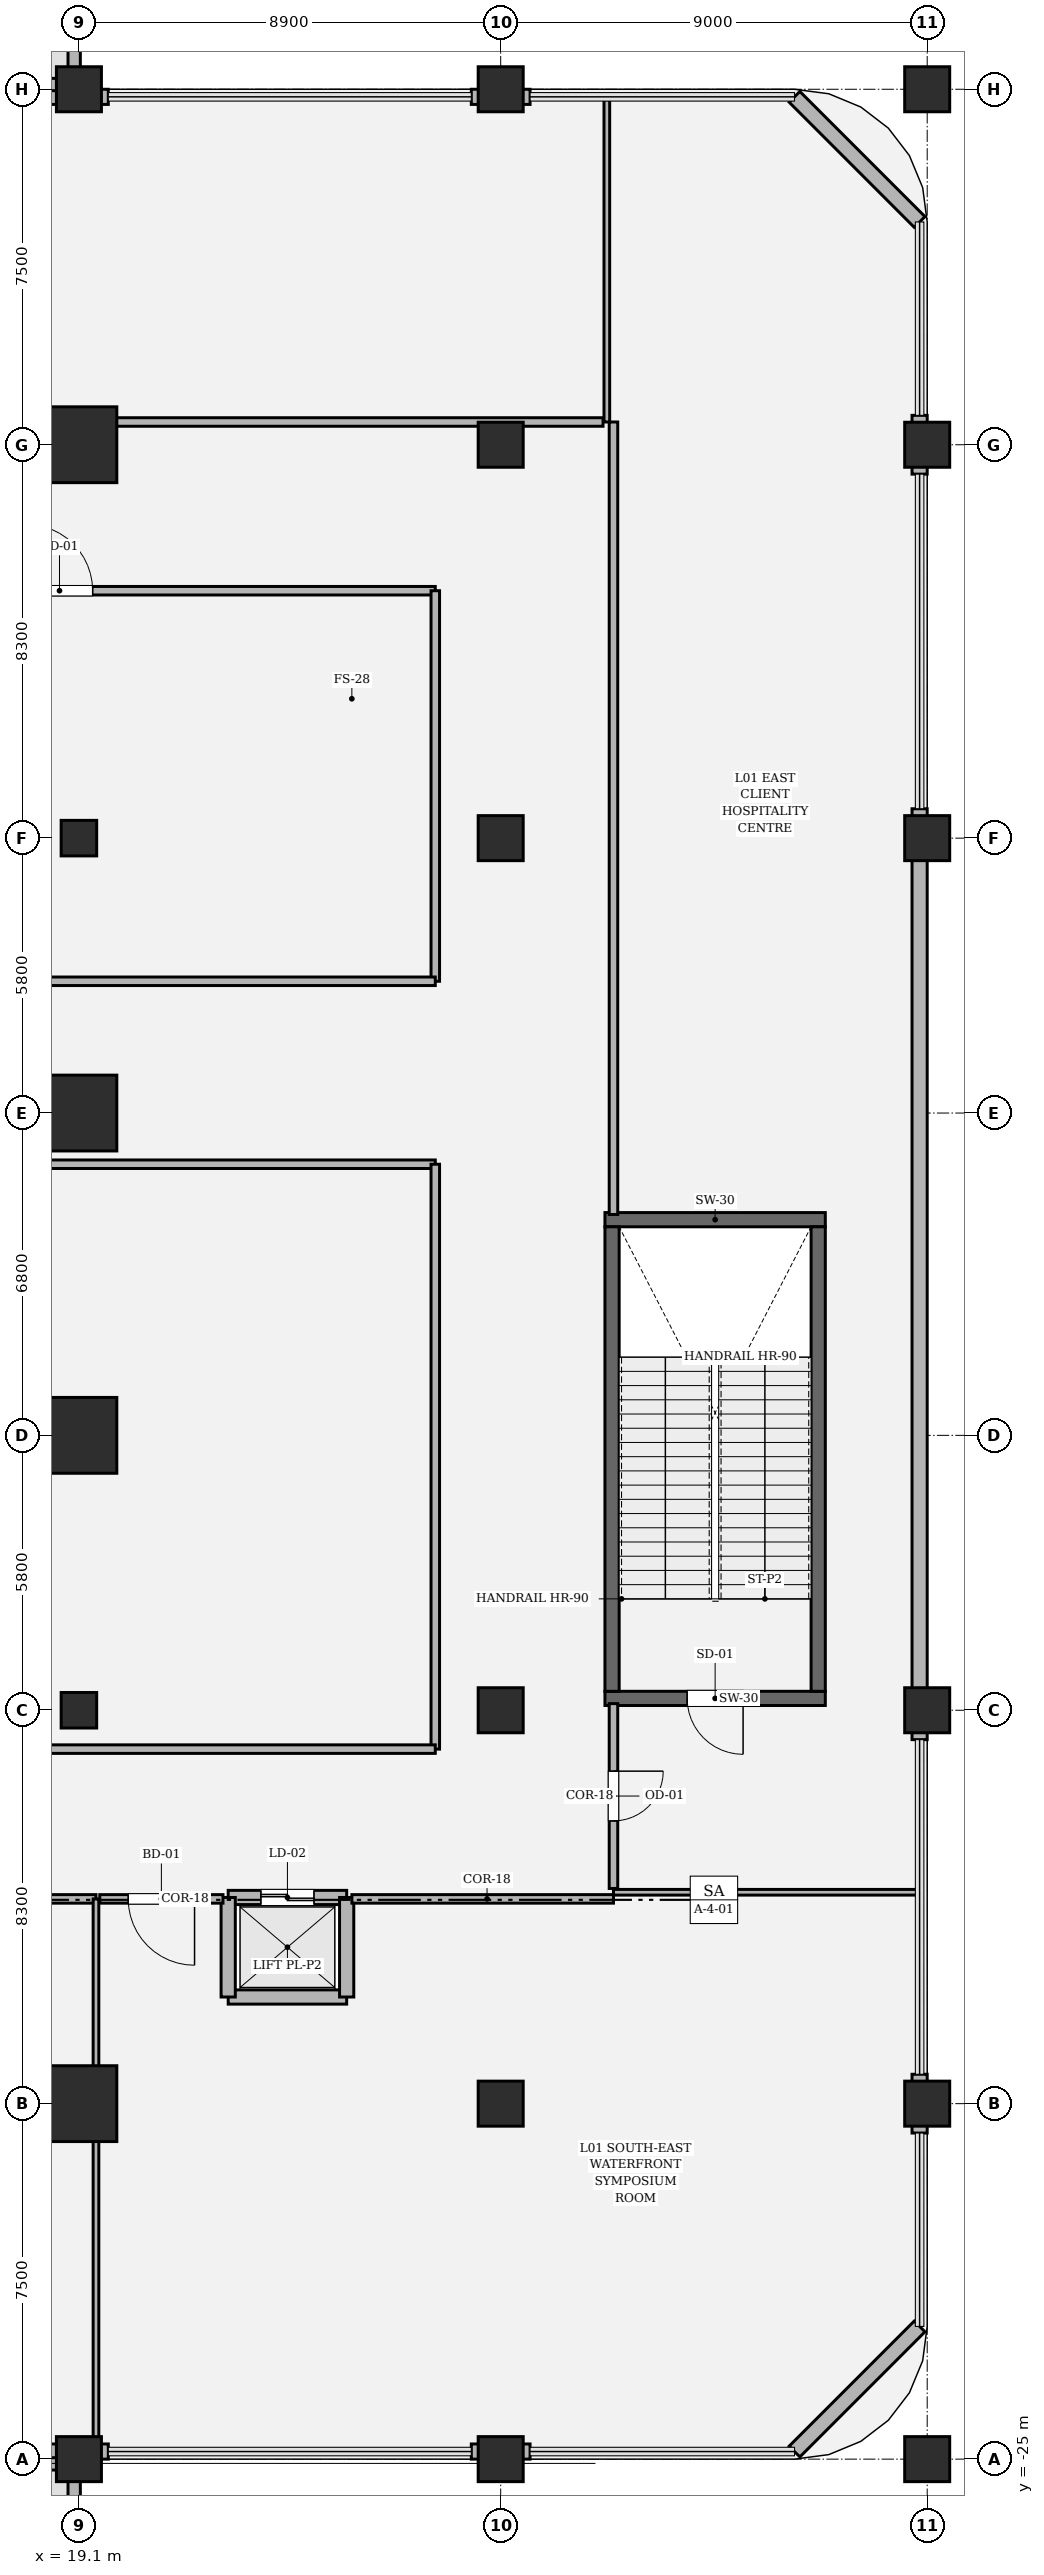
"""IFC4 building model, lengths in metres.
Left out: names, types, materials, properties, quantities, classifications, styles, units other than length and angle.
Written with IfcOpenShell. Run it as: python <this file> out.ifc"""

import sys

from ifc_helpers import new_model, si_unit, direction, frame, frame_2d, origin, origin_2d, place, context, subcontext, project, spatial, rectangle, hollow_rectangle, circle, extrude, element, fill, save


model = new_model("IFC4")
c1 = context("Model", 3, precision=1e-05, world=origin(), true_north=direction((0.0, 1.0)))
c2 = subcontext(c1, "Body", "Model", "MODEL_VIEW")
j1 = project(units=[si_unit("LENGTHUNIT", "METRE"), si_unit("PLANEANGLEUNIT", "RADIAN")], contexts=[c1])
p1 = place(None, origin())
s1 = spatial("IfcSite", under=j1, at=p1, CompositionType="ELEMENT")
p2 = place(p1, origin())
s2 = spatial("IfcBuilding", under=s1, at=p2, CompositionType="ELEMENT")
p3 = place(p2, frame((0.0, 0.0, 6.0)))
s3 = spatial("IfcBuildingStorey", under=s2, at=p3, CompositionType="ELEMENT", Elevation=6.0)
p4 = place(p3, frame((30.2, -8.95, 0.0), z_axis=(0.0, 0.0, 1.0), x_axis=(1.0, 0.0, 0.0)))
e1 = element("IfcWall", 1, at=p4, inside=s3, PredefinedType="SOLIDWALL", context=c2, shape_type="SweptSolid", body=[
    extrude(rectangle(XDim=4.65, YDim=0.3, at=frame_2d((2.325, 0.0))), origin(), (0.0, 0.0, 1.0), 5.4),
])
p5 = place(p4, frame((1.735, 0.0, 0.0)))
e2 = element("IfcOpeningElement", 2, at=p5, cuts=e1, PredefinedType="OPENING", context=c2, shape_type="SweptSolid", body=[
    extrude(rectangle(XDim=1.18, YDim=2.2, at=frame_2d((0.59, 1.1))), frame((0.0, 0.16, 0.0), z_axis=(0.0, -1.0, 0.0), x_axis=(1.0, 0.0, 0.0)), (0.0, 0.0, 1.0), 0.32),
])
p6 = place(p3, frame((34.85, 1.15, 0.0), z_axis=(0.0, 0.0, 1.0), x_axis=(-1.0, 0.0, 0.0)))
e3 = element("IfcWall", 3, at=p6, inside=s3, PredefinedType="SOLIDWALL", context=c2, shape_type="SweptSolid", body=[
    extrude(rectangle(XDim=4.65, YDim=0.3, at=frame_2d((2.325, 0.0))), origin(), (0.0, 0.0, 1.0), 5.4),
])
for number, where, z_axis, x_axis in (
    (4, (30.35, -8.8, 0.0), (0.0, 0.0, 1.0), (0.0, 1.0, 0.0)),
    (5, (34.7, 1.0, 0.0), (0.0, 0.0, 1.0), (0.0, -1.0, 0.0)),
):
    element("IfcWall", number, at=place(p3, frame(where, z_axis=z_axis, x_axis=x_axis)), inside=s3, PredefinedType="SOLIDWALL", context=c2, shape_type="SweptSolid", body=[
        extrude(rectangle(XDim=9.8, YDim=0.3, at=frame_2d((4.9, 0.0))), origin(), (0.0, 0.0, 1.0), 5.4),
    ])
for number, where, z_axis, x_axis in (
    (6, (19.1, -17.5, 0.0), (0.0, 0.0, 1.0), (1.0, 0.0, 0.0)),
    (7, (19.1, -3.4, 0.0), (0.0, 0.0, 1.0), (1.0, 0.0, 0.0)),
    (8, (19.1, 3.4, 0.0), (0.0, 0.0, 1.0), (1.0, 0.0, 0.0)),
    (9, (19.1, 17.5, 0.0), (0.0, 0.0, 1.0), (1.0, 0.0, 0.0)),
):
    element("IfcColumn", number, at=place(p3, frame(where, z_axis=z_axis, x_axis=x_axis)), inside=s3, PredefinedType="COLUMN", context=c2, shape_type="SweptSolid", body=[
        extrude(hollow_rectangle(XDim=1.6, YDim=1.6, WallThickness=0.05, at=origin_2d()), origin(), (0.0, 0.0, 1.0), 5.4),
    ])
for number, where, z_axis, x_axis in (
    (10, (19.1, -25.0, 0.0), (0.0, 0.0, 1.0), (1.0, 0.0, 0.0)),
    (11, (28.0, -25.0, 0.0), (0.0, 0.0, 1.0), (1.0, 0.0, 0.0)),
    (12, (37.0, -25.0, 0.0), (0.0, 0.0, 1.0), (1.0, 0.0, 0.0)),
    (13, (28.0, -17.5, 0.0), (0.0, 0.0, 1.0), (1.0, 0.0, 0.0)),
    (14, (37.0, -17.5, 0.0), (0.0, 0.0, 1.0), (1.0, 0.0, 0.0)),
    (15, (37.0, -9.2, 0.0), (0.0, 0.0, 1.0), (1.0, 0.0, 0.0)),
    (16, (37.0, 9.2, 0.0), (0.0, 0.0, 1.0), (1.0, 0.0, 0.0)),
    (17, (28.0, 17.5, 0.0), (0.0, 0.0, 1.0), (1.0, 0.0, 0.0)),
    (18, (37.0, 17.5, 0.0), (0.0, 0.0, 1.0), (1.0, 0.0, 0.0)),
    (19, (19.1, 25.0, 0.0), (0.0, 0.0, 1.0), (1.0, 0.0, 0.0)),
    (20, (28.0, 25.0, 0.0), (0.0, 0.0, 1.0), (1.0, 0.0, 0.0)),
    (21, (37.0, 25.0, 0.0), (0.0, 0.0, 1.0), (1.0, 0.0, 0.0)),
    (22, (28.0, -9.2, 0.0), (0.0, 0.0, 1.0), (1.0, 0.0, 0.0)),
    (23, (28.0, 9.2, 0.0), (0.0, 0.0, 1.0), (1.0, 0.0, 0.0)),
):
    element("IfcColumn", number, at=place(p3, frame(where, z_axis=z_axis, x_axis=x_axis)), inside=s3, PredefinedType="COLUMN", context=c2, shape_type="SweptSolid", body=[
        extrude(rectangle(XDim=0.95, YDim=0.95, at=origin_2d()), origin(), (0.0, 0.0, 1.0), 5.4),
    ])
for number, where, z_axis, x_axis in (
    (24, (19.1, -9.2, 0.0), (0.0, 0.0, 1.0), (1.0, 0.0, 0.0)),
    (25, (19.1, 9.2, 0.0), (0.0, 0.0, 1.0), (1.0, 0.0, 0.0)),
):
    element("IfcColumn", number, at=place(p3, frame(where, z_axis=z_axis, x_axis=x_axis)), inside=s3, PredefinedType="PILASTER", context=c2, shape_type="SweptSolid", body=[
        extrude(circle(Radius=0.375, at=origin_2d()), origin(), (0.0, 0.0, 1.0), 5.4),
    ])
for number, where, z_axis, x_axis in (
    (26, (18.48, -24.84, 0.0), (0.0, 0.0, 1.0), (1.0, 0.0, 0.0)),
    (27, (19.72, 24.84, 0.0), (0.0, 0.0, 1.0), (-1.0, 0.0, 0.0)),
):
    element("IfcWall", number, at=place(p3, frame(where, z_axis=z_axis, x_axis=x_axis)), inside=s3, PredefinedType="SOLIDWALL", context=c2, shape_type="SweptSolid", body=[
        extrude(rectangle(XDim=1.24, YDim=0.32, at=frame_2d((0.62, 0.0))), origin(), (0.0, 0.0, 1.0), 4.414),
    ])
for number, where, z_axis, x_axis in (
    (28, (27.38, -24.84, 0.0), (0.0, 0.0, 1.0), (1.0, 0.0, 0.0)),
    (29, (28.62, 24.84, 0.0), (0.0, 0.0, 1.0), (-1.0, 0.0, 0.0)),
):
    element("IfcWall", number, at=place(p3, frame(where, z_axis=z_axis, x_axis=x_axis)), inside=s3, PredefinedType="SOLIDWALL", context=c2, shape_type="SweptSolid", body=[
        extrude(rectangle(XDim=1.24, YDim=0.32, at=frame_2d((0.62, 0.0))), origin(), (0.0, 0.0, 1.0), 4.414),
    ])
p7 = place(p3, frame((36.84, 9.82, 0.0), z_axis=(0.0, 0.0, 1.0), x_axis=(0.0, -1.0, 0.0)))
e30 = element("IfcWall", 30, at=p7, inside=s3, PredefinedType="SOLIDWALL", context=c2, shape_type="SweptSolid", body=[
    extrude(rectangle(XDim=19.64, YDim=0.32, at=frame_2d((9.82, 0.0))), origin(), (0.0, 0.0, 1.0), 4.414),
])
for number, where, z_axis, x_axis in (
    (31, (36.84, -16.88, 0.0), (0.0, 0.0, 1.0), (0.0, -1.0, 0.0)),
    (32, (36.84, 18.12, 0.0), (0.0, 0.0, 1.0), (0.0, -1.0, 0.0)),
):
    element("IfcWall", number, at=place(p3, frame(where, z_axis=z_axis, x_axis=x_axis)), inside=s3, PredefinedType="SOLIDWALL", context=c2, shape_type="SweptSolid", body=[
        extrude(rectangle(XDim=1.24, YDim=0.32, at=frame_2d((0.62, 0.0))), origin(), (0.0, 0.0, 1.0), 4.414),
    ])
for number, where, z_axis, x_axis in (
    (33, (34.2, 24.84, 0.0), (0.0, 0.0, 1.0), (0.707, -0.707, 0.0)),
    (34, (36.84, -22.2, 0.0), (0.0, 0.0, 1.0), (-0.707, -0.707, 0.0)),
):
    element("IfcWall", number, at=place(p3, frame(where, z_axis=z_axis, x_axis=x_axis)), inside=s3, PredefinedType="SOLIDWALL", context=c2, shape_type="SweptSolid", body=[
        extrude(rectangle(XDim=3.734, YDim=0.32, at=frame_2d((1.867, 0.0))), origin(), (0.0, 0.0, 1.0), 4.564),
    ])
p8 = place(p3, frame((19.0, -27.62, 0.0), z_axis=(0.0, 0.0, 1.0), x_axis=(0.0, 1.0, 0.0)))
e35 = element("IfcWall", 35, at=p8, inside=s3, PredefinedType="PARAPET", context=c2, shape_type="SweptSolid", body=[
    extrude(rectangle(XDim=2.52, YDim=0.26, at=frame_2d((1.26, 0.0))), origin(), (0.0, 0.0, 1.0), 1.15),
])
for number, where, z_axis, x_axis in (
    (36, (19.0, -25.1, 0.0), (0.0, 0.0, 1.0), (-1.0, 0.0, 0.0)),
    (37, (-19.0, 25.1, 0.0), (0.0, 0.0, 1.0), (1.0, 0.0, 0.0)),
):
    element("IfcWall", number, at=place(p3, frame(where, z_axis=z_axis, x_axis=x_axis)), inside=s3, PredefinedType="PARAPET", context=c2, shape_type="SweptSolid", body=[
        extrude(rectangle(XDim=38.0, YDim=0.26, at=frame_2d((19.0, 0.0))), origin(), (0.0, 0.0, 1.0), 1.15),
    ])
p9 = place(p3, frame((19.0, 25.1, 0.0), z_axis=(0.0, 0.0, 1.0), x_axis=(0.0, 1.0, 0.0)))
e38 = element("IfcWall", 38, at=p9, inside=s3, PredefinedType="PARAPET", context=c2, shape_type="SweptSolid", body=[
    extrude(rectangle(XDim=2.52, YDim=0.26, at=frame_2d((1.26, 0.0))), origin(), (0.0, 0.0, 1.0), 1.15),
])
p10 = place(p3, frame((22.25, -13.15, 0.0), z_axis=(0.0, 0.0, 1.0), x_axis=(1.0, 0.0, 0.0)))
e39 = element("IfcWall", 39, at=p10, inside=s3, PredefinedType="SOLIDWALL", context=c2, shape_type="SweptSolid", body=[
    extrude(rectangle(XDim=2.5, YDim=0.3, at=frame_2d((1.25, 0.0))), origin(), (0.0, 0.0, 1.0), 5.12),
])
p11 = place(p10, frame((0.69, 0.0, 0.0)))
e40 = element("IfcOpeningElement", 40, at=p11, cuts=e39, PredefinedType="OPENING", context=c2, shape_type="SweptSolid", body=[
    extrude(rectangle(XDim=1.12, YDim=2.25, at=frame_2d((0.56, 1.125))), frame((0.0, 0.16, 0.0), z_axis=(0.0, -1.0, 0.0), x_axis=(1.0, 0.0, 0.0)), (0.0, 0.0, 1.0), 0.32),
])
p12 = place(p3, frame((22.25, -15.25, 0.0), z_axis=(0.0, 0.0, 1.0), x_axis=(1.0, 0.0, 0.0)))
e41 = element("IfcWall", 41, at=p12, inside=s3, PredefinedType="SOLIDWALL", context=c2, shape_type="SweptSolid", body=[
    extrude(rectangle(XDim=2.5, YDim=0.3, at=frame_2d((1.25, 0.0))), origin(), (0.0, 0.0, 1.0), 5.12),
])
for number, where, z_axis, x_axis in (
    (42, (22.25, -15.25, 0.0), (0.0, 0.0, 1.0), (0.0, 1.0, 0.0)),
    (43, (24.75, -15.25, 0.0), (0.0, 0.0, 1.0), (0.0, 1.0, 0.0)),
):
    element("IfcWall", number, at=place(p3, frame(where, z_axis=z_axis, x_axis=x_axis)), inside=s3, PredefinedType="SOLIDWALL", context=c2, shape_type="SweptSolid", body=[
        extrude(rectangle(XDim=2.1, YDim=0.3, at=frame_2d((1.05, 0.0))), origin(), (0.0, 0.0, 1.0), 5.12),
    ])
p13 = place(p3, frame((-11.34, -13.18, 0.0), z_axis=(0.0, 0.0, 1.0), x_axis=(1.0, 0.0, 0.0)))
e44 = element("IfcWall", 44, at=p13, inside=s3, PredefinedType="PARTITIONING", context=c2, shape_type="SweptSolid", body=[
    extrude(rectangle(XDim=30.8, YDim=0.18, at=frame_2d((15.4, 0.0))), origin(), (0.0, 0.0, 1.0), 4.414),
])
p14 = place(p13, frame((14.7, 0.0, 0.0)))
e45 = element("IfcOpeningElement", 45, at=p14, cuts=e44, PredefinedType="OPENING", context=c2, shape_type="SweptSolid", body=[
    extrude(rectangle(XDim=1.4, YDim=2.25, at=frame_2d((0.7, 1.125))), frame((0.0, 0.1, 0.0), z_axis=(0.0, -1.0, 0.0), x_axis=(1.0, 0.0, 0.0)), (0.0, 0.0, 1.0), 0.2),
])
p15 = place(p3, frame((19.46, -13.18, 0.0), z_axis=(0.0, 0.0, 1.0), x_axis=(0.0, -1.0, 0.0)))
e46 = element("IfcWall", 46, at=p15, inside=s3, PredefinedType="PARTITIONING", context=c2, shape_type="SweptSolid", body=[
    extrude(rectangle(XDim=11.6, YDim=0.12, at=frame_2d((5.8, 0.0))), origin(), (0.0, 0.0, 1.0), 4.414),
])
p16 = place(p3, frame((19.54, -13.18, 0.0), z_axis=(0.0, 0.0, 1.0), x_axis=(1.0, 0.0, 0.0)))
e47 = element("IfcWall", 47, at=p16, inside=s3, PredefinedType="PARTITIONING", context=c2, shape_type="SweptSolid", body=[
    extrude(rectangle(XDim=2.6, YDim=0.18, at=frame_2d((1.3, 0.0))), origin(), (0.0, 0.0, 1.0), 5.12),
])
p17 = place(p16, frame((0.6, 0.0, 0.0)))
e48 = element("IfcOpeningElement", 48, at=p17, cuts=e47, PredefinedType="OPENING", context=c2, shape_type="SweptSolid", body=[
    extrude(rectangle(XDim=1.4, YDim=2.25, at=frame_2d((0.7, 1.125))), frame((0.0, 0.1, 0.0), z_axis=(0.0, -1.0, 0.0), x_axis=(1.0, 0.0, 0.0)), (0.0, 0.0, 1.0), 0.2),
])
p18 = place(p3, frame((24.86, -13.18, 0.0), z_axis=(0.0, 0.0, 1.0), x_axis=(1.0, 0.0, 0.0)))
e49 = element("IfcWall", 49, at=p18, inside=s3, PredefinedType="PARTITIONING", context=c2, shape_type="SweptSolid", body=[
    extrude(rectangle(XDim=5.52, YDim=0.18, at=frame_2d((2.76, 0.0))), origin(), (0.0, 0.0, 1.0), 4.414),
])
p19 = place(p3, frame((30.38, -13.04, 0.0), z_axis=(0.0, 0.0, 1.0), x_axis=(1.0, 0.0, 0.0)))
e50 = element("IfcWall", 50, at=p19, inside=s3, PredefinedType="PARTITIONING", context=c2, shape_type="SweptSolid", body=[
    extrude(rectangle(XDim=6.4, YDim=0.12, at=frame_2d((3.2, 0.0))), origin(), (0.0, 0.0, 1.0), 5.12),
])
p20 = place(p3, frame((30.38, -12.96, 0.0), z_axis=(0.0, 0.0, 1.0), x_axis=(0.0, 1.0, 0.0)))
e51 = element("IfcWall", 51, at=p20, inside=s3, PredefinedType="PARTITIONING", context=c2, shape_type="SweptSolid", body=[
    extrude(rectangle(XDim=3.9, YDim=0.18, at=frame_2d((1.95, 0.0))), origin(), (0.0, 0.0, 1.0), 4.414),
])
p21 = place(p20, frame((1.425, 0.0, 0.0)))
e52 = element("IfcOpeningElement", 52, at=p21, cuts=e51, PredefinedType="OPENING", context=c2, shape_type="SweptSolid", body=[
    extrude(rectangle(XDim=1.05, YDim=2.2, at=frame_2d((0.525, 1.1))), frame((0.0, 0.1, 0.0), z_axis=(0.0, -1.0, 0.0), x_axis=(1.0, 0.0, 0.0)), (0.0, 0.0, 1.0), 0.2),
])
p22 = place(p3, frame((30.38, 1.26, 0.0), z_axis=(0.0, 0.0, 1.0), x_axis=(0.0, 1.0, 0.0)))
e53 = element("IfcWall", 53, at=p22, inside=s3, PredefinedType="PARTITIONING", context=c2, shape_type="SweptSolid", body=[
    extrude(rectangle(XDim=16.72, YDim=0.18, at=frame_2d((8.36, 0.0))), origin(), (0.0, 0.0, 1.0), 4.414),
])
p23 = place(p3, frame((30.24, 17.98, 0.0), z_axis=(0.0, 0.0, 1.0), x_axis=(0.0, 1.0, 0.0)))
e54 = element("IfcWall", 54, at=p23, inside=s3, PredefinedType="PARTITIONING", context=c2, shape_type="SweptSolid", body=[
    extrude(rectangle(XDim=6.8, YDim=0.12, at=frame_2d((3.4, 0.0))), origin(), (0.0, 0.0, 1.0), 5.12),
])
p24 = place(p3, frame((30.16, 17.98, 0.0), z_axis=(0.0, 0.0, 1.0), x_axis=(-1.0, 0.0, 0.0)))
e55 = element("IfcWall", 55, at=p24, inside=s3, PredefinedType="PARTITIONING", context=c2, shape_type="SweptSolid", body=[
    extrude(rectangle(XDim=36.3, YDim=0.18, at=frame_2d((18.15, 0.0))), origin(), (0.0, 0.0, 1.0), 4.414),
])
p25 = place(p24, frame((17.625, 0.0, 0.0)))
e56 = element("IfcOpeningElement", 56, at=p25, cuts=e55, PredefinedType="OPENING", context=c2, shape_type="SweptSolid", body=[
    extrude(rectangle(XDim=1.05, YDim=2.2, at=frame_2d((0.525, 1.1))), frame((0.0, 0.1, 0.0), z_axis=(0.0, -1.0, 0.0), x_axis=(1.0, 0.0, 0.0)), (0.0, 0.0, 1.0), 0.2),
])
p26 = place(p3, frame((10.76, 14.42, 0.0), z_axis=(0.0, 0.0, 1.0), x_axis=(1.0, 0.0, 0.0)))
e57 = element("IfcWall", 57, at=p26, inside=s3, PredefinedType="PARTITIONING", context=c2, shape_type="SweptSolid", body=[
    extrude(rectangle(XDim=15.86, YDim=0.18, at=frame_2d((7.93, 0.0))), origin(), (0.0, 0.0, 1.0), 4.414),
])
p27 = place(p26, frame((7.23, 0.0, 0.0)))
e58 = element("IfcOpeningElement", 58, at=p27, cuts=e57, PredefinedType="OPENING", context=c2, shape_type="SweptSolid", body=[
    extrude(rectangle(XDim=1.4, YDim=2.25, at=frame_2d((0.7, 1.125))), frame((0.0, 0.1, 0.0), z_axis=(0.0, -1.0, 0.0), x_axis=(1.0, 0.0, 0.0)), (0.0, 0.0, 1.0), 0.2),
])
p28 = place(p3, frame((26.62, 14.42, 0.0), z_axis=(0.0, 0.0, 1.0), x_axis=(0.0, -1.0, 0.0)))
e59 = element("IfcWall", 59, at=p28, inside=s3, PredefinedType="PARTITIONING", context=c2, shape_type="SweptSolid", body=[
    extrude(rectangle(XDim=8.24, YDim=0.18, at=frame_2d((4.12, 0.0))), origin(), (0.0, 0.0, 1.0), 4.414),
])
p29 = place(p3, frame((26.62, 6.18, 0.0), z_axis=(0.0, 0.0, 1.0), x_axis=(-1.0, 0.0, 0.0)))
e60 = element("IfcWall", 60, at=p29, inside=s3, PredefinedType="PARTITIONING", context=c2, shape_type="SweptSolid", body=[
    extrude(rectangle(XDim=15.86, YDim=0.18, at=frame_2d((7.93, 0.0))), origin(), (0.0, 0.0, 1.0), 4.414),
])
p30 = place(p3, frame((10.76, 2.32, 0.0), z_axis=(0.0, 0.0, 1.0), x_axis=(1.0, 0.0, 0.0)))
e61 = element("IfcWall", 61, at=p30, inside=s3, PredefinedType="PARTITIONING", context=c2, shape_type="SweptSolid", body=[
    extrude(rectangle(XDim=15.86, YDim=0.18, at=frame_2d((7.93, 0.0))), origin(), (0.0, 0.0, 1.0), 4.414),
])
p31 = place(p30, frame((5.88, 0.0, 0.0)))
e62 = element("IfcOpeningElement", 62, at=p31, cuts=e61, PredefinedType="OPENING", context=c2, shape_type="SweptSolid", body=[
    extrude(rectangle(XDim=1.4, YDim=2.25, at=frame_2d((0.7, 1.125))), frame((0.0, 0.1, 0.0), z_axis=(0.0, -1.0, 0.0), x_axis=(1.0, 0.0, 0.0)), (0.0, 0.0, 1.0), 0.2),
])
p32 = place(p3, frame((26.62, 2.32, 0.0), z_axis=(0.0, 0.0, 1.0), x_axis=(0.0, -1.0, 0.0)))
e63 = element("IfcWall", 63, at=p32, inside=s3, PredefinedType="PARTITIONING", context=c2, shape_type="SweptSolid", body=[
    extrude(rectangle(XDim=12.34, YDim=0.18, at=frame_2d((6.17, 0.0))), origin(), (0.0, 0.0, 1.0), 4.414),
])
p33 = place(p3, frame((26.62, -10.02, 0.0), z_axis=(0.0, 0.0, 1.0), x_axis=(-1.0, 0.0, 0.0)))
e64 = element("IfcWall", 64, at=p33, inside=s3, PredefinedType="PARTITIONING", context=c2, shape_type="SweptSolid", body=[
    extrude(rectangle(XDim=15.86, YDim=0.18, at=frame_2d((7.93, 0.0))), origin(), (0.0, 0.0, 1.0), 4.414),
])
p34 = place(p5, origin())
e65 = element("IfcDoor", 65, at=p34, inside=s3, OperationType="SINGLE_SWING_RIGHT", PredefinedType="DOOR", context=c2, shape_type="SweptSolid", body=[
    extrude(rectangle(XDim=1.18, YDim=2.2, at=frame_2d((0.59, 1.1))), frame((0.0, 0.025, 0.0), z_axis=(0.0, -1.0, 0.0), x_axis=(1.0, 0.0, 0.0)), (0.0, 0.0, 1.0), 0.05),
])
fill(e2, e65)
p35 = place(p11, origin())
e66 = element("IfcDoor", 66, at=p35, inside=s3, OperationType="DOUBLE_DOOR_SLIDING", PredefinedType="DOOR", context=c2, shape_type="SweptSolid", body=[
    extrude(rectangle(XDim=1.12, YDim=2.25, at=frame_2d((0.56, 1.125))), frame((0.0, 0.025, 0.0), z_axis=(0.0, -1.0, 0.0), x_axis=(1.0, 0.0, 0.0)), (0.0, 0.0, 1.0), 0.05),
])
fill(e40, e66)
p36 = place(p17, origin())
e67 = element("IfcDoor", 67, at=p36, inside=s3, OperationType="SINGLE_SWING_RIGHT", PredefinedType="DOOR", context=c2, shape_type="SweptSolid", body=[
    extrude(rectangle(XDim=1.4, YDim=2.25, at=frame_2d((0.7, 1.125))), frame((0.0, 0.025, 0.0), z_axis=(0.0, -1.0, 0.0), x_axis=(1.0, 0.0, 0.0)), (0.0, 0.0, 1.0), 0.05),
])
fill(e48, e67)
p37 = place(p21, origin())
e68 = element("IfcDoor", 68, at=p37, inside=s3, OperationType="SINGLE_SWING_RIGHT", PredefinedType="DOOR", context=c2, shape_type="SweptSolid", body=[
    extrude(rectangle(XDim=1.05, YDim=2.2, at=frame_2d((0.525, 1.1))), frame((0.0, 0.025, 0.0), z_axis=(0.0, -1.0, 0.0), x_axis=(1.0, 0.0, 0.0)), (0.0, 0.0, 1.0), 0.05),
])
fill(e52, e68)
p38 = place(p27, origin())
e69 = element("IfcDoor", 69, at=p38, inside=s3, OperationType="SINGLE_SWING_LEFT", PredefinedType="DOOR", context=c2, shape_type="SweptSolid", body=[
    extrude(rectangle(XDim=1.4, YDim=2.25, at=frame_2d((0.7, 1.125))), frame((0.0, 0.025, 0.0), z_axis=(0.0, -1.0, 0.0), x_axis=(1.0, 0.0, 0.0)), (0.0, 0.0, 1.0), 0.05),
])
fill(e58, e69)
save(model, sys.argv[1])
